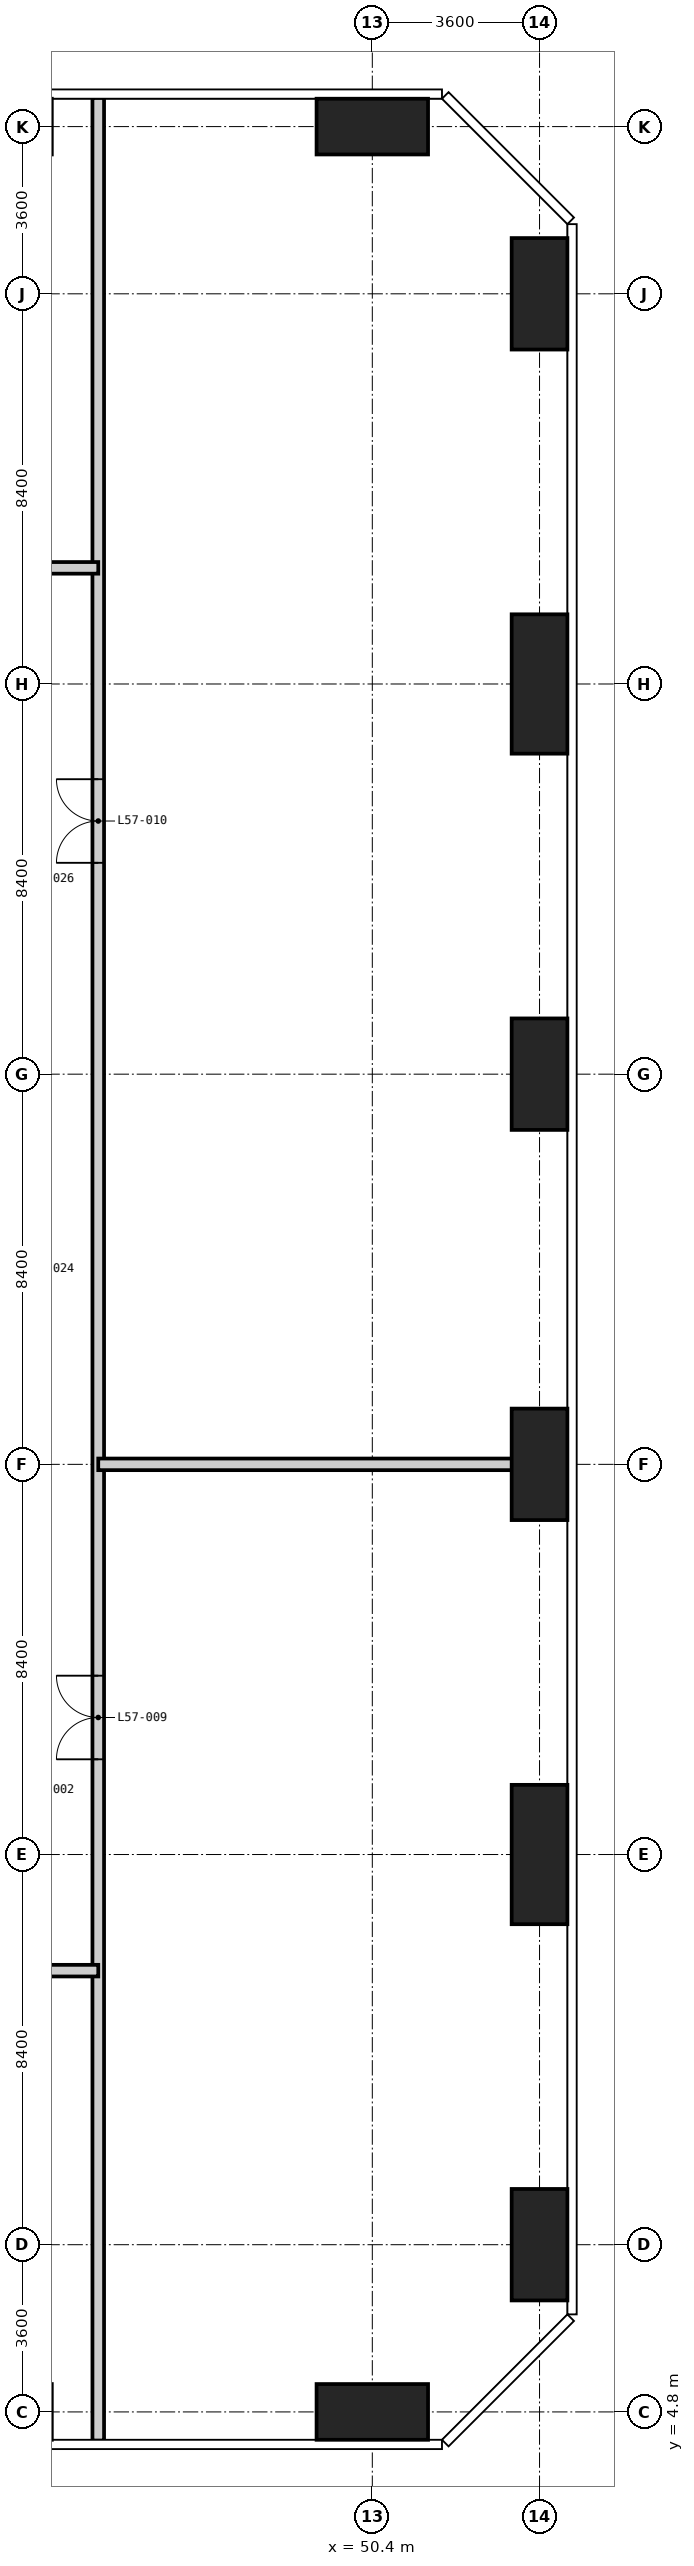
"""IFC4 building model, lengths in metres.
Left out: names, types, materials, properties, quantities, classifications, styles, units other than length and angle.
Written with IfcOpenShell. Run it as: python <this file> out.ifc"""

import sys

from ifc_helpers import new_model, si_unit, direction, frame, frame_2d, origin, origin_2d, place, context, subcontext, project, spatial, rectangle, extrude, element, fill, save


model = new_model("IFC4")
c1 = context("Model", 3, precision=1e-05, world=origin(), true_north=direction((0.0, 1.0)))
c2 = subcontext(c1, "Body", "Model", "MODEL_VIEW")
j1 = project(units=[si_unit("LENGTHUNIT", "METRE"), si_unit("PLANEANGLEUNIT", "RADIAN")], contexts=[c1])
p1 = place(None, origin())
s1 = spatial("IfcSite", under=j1, at=p1, CompositionType="ELEMENT")
p2 = place(p1, origin())
s2 = spatial("IfcBuilding", under=s1, at=p2, CompositionType="ELEMENT")
p3 = place(p2, frame((0.0, 0.0, 220.2)))
s3 = spatial("IfcBuildingStorey", under=s2, at=p3, CompositionType="ELEMENT", Elevation=220.2)
for number, where, z_axis, x_axis in (
    (1, (50.4, 4.8, -0.4), (0.0, 0.0, 1.0), (1.0, 0.0, 0.0)),
    (2, (50.4, 54.0, -0.4), (0.0, 0.0, 1.0), (1.0, 0.0, 0.0)),
):
    element("IfcColumn", number, at=place(p3, frame(where, z_axis=z_axis, x_axis=x_axis)), inside=s3, PredefinedType="COLUMN", context=c2, shape_type="SweptSolid", body=[
        extrude(rectangle(XDim=2.4, YDim=1.2, at=origin_2d()), origin(), (0.0, 0.0, 1.0), 5.45),
    ])
p4 = place(p3, frame((54.0, 8.4, -0.4), z_axis=(0.0, 0.0, 1.0), x_axis=(1.0, 0.0, 0.0)))
e3 = element("IfcColumn", 3, at=p4, inside=s3, PredefinedType="COLUMN", context=c2, shape_type="SweptSolid", body=[
    extrude(rectangle(XDim=1.2, YDim=2.4, at=origin_2d()), origin(), (0.0, 0.0, 1.0), 5.45),
])
p5 = place(p3, frame((54.0, 16.8, -0.4), z_axis=(0.0, 0.0, 1.0), x_axis=(1.0, 0.0, 0.0)))
e4 = element("IfcColumn", 4, at=p5, inside=s3, PredefinedType="COLUMN", context=c2, shape_type="SweptSolid", body=[
    extrude(rectangle(XDim=1.2, YDim=3.0, at=origin_2d()), origin(), (0.0, 0.0, 1.0), 5.45),
])
for number, where, z_axis, x_axis in (
    (5, (54.0, 25.2, -0.4), (0.0, 0.0, 1.0), (1.0, 0.0, 0.0)),
    (6, (54.0, 33.6, -0.4), (0.0, 0.0, 1.0), (1.0, 0.0, 0.0)),
):
    element("IfcColumn", number, at=place(p3, frame(where, z_axis=z_axis, x_axis=x_axis)), inside=s3, PredefinedType="COLUMN", context=c2, shape_type="SweptSolid", body=[
        extrude(rectangle(XDim=1.2, YDim=2.4, at=origin_2d()), origin(), (0.0, 0.0, 1.0), 5.45),
    ])
p6 = place(p3, frame((54.0, 42.0, -0.4), z_axis=(0.0, 0.0, 1.0), x_axis=(1.0, 0.0, 0.0)))
e7 = element("IfcColumn", 7, at=p6, inside=s3, PredefinedType="COLUMN", context=c2, shape_type="SweptSolid", body=[
    extrude(rectangle(XDim=1.2, YDim=3.0, at=origin_2d()), origin(), (0.0, 0.0, 1.0), 5.45),
])
p7 = place(p3, frame((54.0, 50.4, -0.4), z_axis=(0.0, 0.0, 1.0), x_axis=(1.0, 0.0, 0.0)))
e8 = element("IfcColumn", 8, at=p7, inside=s3, PredefinedType="COLUMN", context=c2, shape_type="SweptSolid", body=[
    extrude(rectangle(XDim=1.2, YDim=2.4, at=origin_2d()), origin(), (0.0, 0.0, 1.0), 5.45),
])
p8 = place(p3, frame((44.5, 4.182, 0.0), z_axis=(0.0, 0.0, 1.0), x_axis=(0.0, 1.0, 0.0)))
e9 = element("IfcWall", 9, at=p8, inside=s3, PredefinedType="PARTITIONING", context=c2, shape_type="SweptSolid", body=[
    extrude(rectangle(XDim=50.436, YDim=0.25, at=frame_2d((25.218, 0.0))), origin(), (0.0, 0.0, 1.0), 5.05),
])
p9 = place(p8, frame((14.668, 0.0, 0.0)))
e10 = element("IfcOpeningElement", 10, at=p9, cuts=e9, PredefinedType="OPENING", context=c2, shape_type="SweptSolid", body=[
    extrude(rectangle(XDim=1.8, YDim=2.4, at=frame_2d((0.9, 1.2))), frame((0.0, 0.135, 0.0), z_axis=(0.0, -1.0, 0.0), x_axis=(1.0, 0.0, 0.0)), (0.0, 0.0, 1.0), 0.27),
])
p10 = place(p8, frame((33.968, 0.0, 0.0)))
e11 = element("IfcOpeningElement", 11, at=p10, cuts=e9, PredefinedType="OPENING", context=c2, shape_type="SweptSolid", body=[
    extrude(rectangle(XDim=1.8, YDim=2.4, at=frame_2d((0.9, 1.2))), frame((0.0, 0.135, 0.0), z_axis=(0.0, -1.0, 0.0), x_axis=(1.0, 0.0, 0.0)), (0.0, 0.0, 1.0), 0.27),
])
p11 = place(p3, frame((14.3, 14.3, 0.0), z_axis=(0.0, 0.0, 1.0), x_axis=(1.0, 0.0, 0.0)))
e12 = element("IfcWall", 12, at=p11, inside=s3, PredefinedType="PARTITIONING", context=c2, shape_type="SweptSolid", body=[
    extrude(rectangle(XDim=30.2, YDim=0.25, at=frame_2d((15.1, 0.0))), origin(), (0.0, 0.0, 1.0), 5.05),
])
p12 = place(p11, frame((19.65, 0.0, 0.0)))
e13 = element("IfcOpeningElement", 13, at=p12, cuts=e12, PredefinedType="OPENING", context=c2, shape_type="SweptSolid", body=[
    extrude(rectangle(XDim=1.8, YDim=2.4, at=frame_2d((0.9, 1.2))), frame((0.0, 0.135, 0.0), z_axis=(0.0, -1.0, 0.0), x_axis=(1.0, 0.0, 0.0)), (0.0, 0.0, 1.0), 0.27),
])
p13 = place(p11, frame((4.55, 0.0, 0.0)))
e14 = element("IfcOpeningElement", 14, at=p13, cuts=e12, PredefinedType="OPENING", context=c2, shape_type="SweptSolid", body=[
    extrude(rectangle(XDim=1.8, YDim=2.4, at=frame_2d((0.9, 1.2))), frame((0.0, 0.135, 0.0), z_axis=(0.0, -1.0, 0.0), x_axis=(1.0, 0.0, 0.0)), (0.0, 0.0, 1.0), 0.27),
])
p14 = place(p3, frame((44.5, 25.2, 0.0), z_axis=(0.0, 0.0, 1.0), x_axis=(1.0, 0.0, 0.0)))
e15 = element("IfcWall", 15, at=p14, inside=s3, PredefinedType="PARTITIONING", context=c2, shape_type="SweptSolid", body=[
    extrude(rectangle(XDim=10.118, YDim=0.25, at=frame_2d((5.059, 0.0))), origin(), (0.0, 0.0, 1.0), 5.05),
])
p15 = place(p3, frame((14.3, 44.5, 0.0), z_axis=(0.0, 0.0, 1.0), x_axis=(1.0, 0.0, 0.0)))
e16 = element("IfcWall", 16, at=p15, inside=s3, PredefinedType="PARTITIONING", context=c2, shape_type="SweptSolid", body=[
    extrude(rectangle(XDim=30.2, YDim=0.25, at=frame_2d((15.1, 0.0))), origin(), (0.0, 0.0, 1.0), 5.05),
])
p16 = place(p15, frame((4.55, 0.0, 0.0)))
e17 = element("IfcOpeningElement", 17, at=p16, cuts=e16, PredefinedType="OPENING", context=c2, shape_type="SweptSolid", body=[
    extrude(rectangle(XDim=1.8, YDim=2.4, at=frame_2d((0.9, 1.2))), frame((0.0, 0.135, 0.0), z_axis=(0.0, -1.0, 0.0), x_axis=(1.0, 0.0, 0.0)), (0.0, 0.0, 1.0), 0.27),
])
p17 = place(p15, frame((19.65, 0.0, 0.0)))
e18 = element("IfcOpeningElement", 18, at=p17, cuts=e16, PredefinedType="OPENING", context=c2, shape_type="SweptSolid", body=[
    extrude(rectangle(XDim=1.8, YDim=2.4, at=frame_2d((0.9, 1.2))), frame((0.0, 0.135, 0.0), z_axis=(0.0, -1.0, 0.0), x_axis=(1.0, 0.0, 0.0)), (0.0, 0.0, 1.0), 0.27),
])
p18 = place(p9, origin())
e19 = element("IfcDoor", 19, at=p18, inside=s3, OperationType="DOUBLE_DOOR_DOUBLE_SWING", PredefinedType="DOOR", context=c2, shape_type="SweptSolid", body=[
    extrude(rectangle(XDim=1.8, YDim=2.4, at=frame_2d((0.9, 1.2))), frame((0.0, 0.025, 0.0), z_axis=(0.0, -1.0, 0.0), x_axis=(1.0, 0.0, 0.0)), (0.0, 0.0, 1.0), 0.05),
])
fill(e10, e19)
p19 = place(p10, origin())
e20 = element("IfcDoor", 20, at=p19, inside=s3, OperationType="DOUBLE_DOOR_DOUBLE_SWING", PredefinedType="DOOR", context=c2, shape_type="SweptSolid", body=[
    extrude(rectangle(XDim=1.8, YDim=2.4, at=frame_2d((0.9, 1.2))), frame((0.0, 0.025, 0.0), z_axis=(0.0, -1.0, 0.0), x_axis=(1.0, 0.0, 0.0)), (0.0, 0.0, 1.0), 0.05),
])
fill(e11, e20)
save(model, sys.argv[1])
